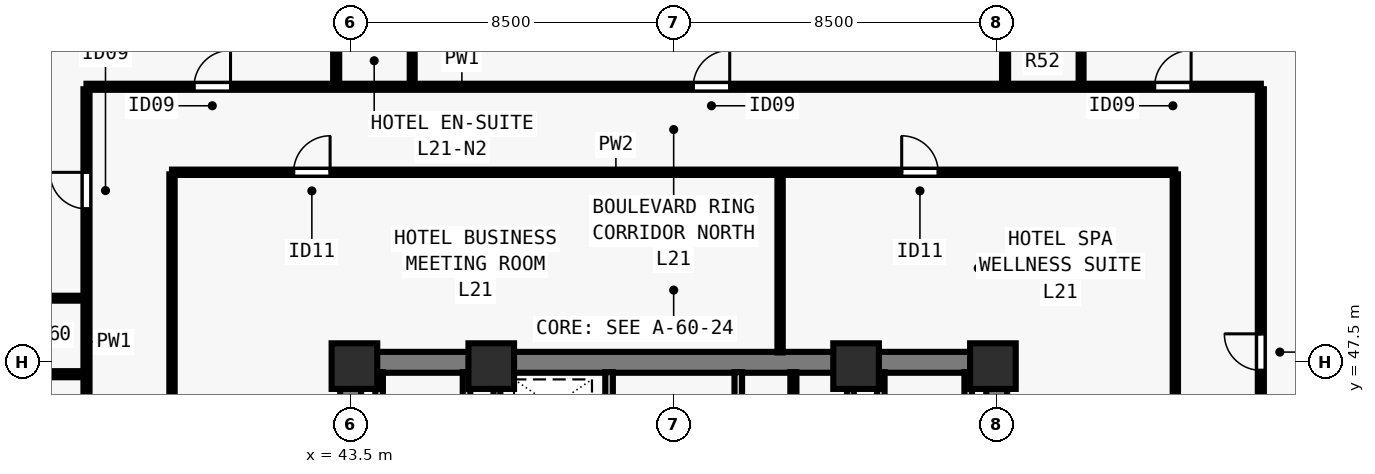
"""IFC4 building model, lengths in metres.
Left out: names, types, materials, properties, quantities, classifications, styles, units other than length and angle.
Written with IfcOpenShell. Run it as: python <this file> out.ifc"""

import sys

from ifc_helpers import new_model, si_unit, direction, frame, frame_2d, origin, origin_2d, place, context, subcontext, project, spatial, rectangle, extrude, element, fill, save


model = new_model("IFC4")
c1 = context("Model", 3, precision=1e-05, world=origin(), true_north=direction((0.0, 1.0)))
c2 = subcontext(c1, "Body", "Model", "MODEL_VIEW")
j1 = project(units=[si_unit("LENGTHUNIT", "METRE"), si_unit("PLANEANGLEUNIT", "RADIAN")], contexts=[c1])
p1 = place(None, origin())
s1 = spatial("IfcSite", under=j1, at=p1, CompositionType="ELEMENT")
p2 = place(p1, origin())
s2 = spatial("IfcBuilding", under=s1, at=p2, CompositionType="ELEMENT")
p3 = place(p2, frame((0.0, 0.0, 79.5)))
s3 = spatial("IfcBuildingStorey", under=s2, at=p3, CompositionType="ELEMENT", Elevation=79.5)
for number, where, z_axis, x_axis in (
    (1, (43.6, 47.4, 0.0), (0.0, 0.0, 1.0), (1.0, 0.0, 0.0)),
    (2, (47.2, 47.4, 0.0), (0.0, 0.0, 1.0), (1.0, 0.0, 0.0)),
    (3, (56.8, 47.4, 0.0), (0.0, 0.0, 1.0), (1.0, 0.0, 0.0)),
    (4, (60.4, 47.4, 0.0), (0.0, 0.0, 1.0), (1.0, 0.0, 0.0)),
):
    element("IfcColumn", number, at=place(p3, frame(where, z_axis=z_axis, x_axis=x_axis)), inside=s3, PredefinedType="COLUMN", context=c2, shape_type="SweptSolid", body=[
        extrude(rectangle(XDim=1.2, YDim=1.2, at=origin_2d()), origin(), (0.0, 0.0, 1.0), 3.5),
    ])
p4 = place(p3, frame((43.225, 47.5, 0.0), z_axis=(0.0, 0.0, 1.0), x_axis=(1.0, 0.0, 0.0)))
e5 = element("IfcWall", 5, at=p4, inside=s3, PredefinedType="SHEAR", context=c2, shape_type="SweptSolid", body=[
    extrude(rectangle(XDim=17.55, YDim=0.55, at=frame_2d((8.775, 0.0))), origin(), (0.0, 0.0, 1.0), 3.28),
])
for number, where, z_axis, x_axis in (
    (6, (43.5, 40.8, 0.0), (0.0, 0.0, 1.0), (0.0, 1.0, 0.0)),
    (7, (60.5, 40.8, 0.0), (0.0, 0.0, 1.0), (0.0, 1.0, 0.0)),
):
    element("IfcWall", number, at=place(p3, frame(where, z_axis=z_axis, x_axis=x_axis)), inside=s3, PredefinedType="SHEAR", context=c2, shape_type="SweptSolid", body=[
        extrude(rectangle(XDim=6.435, YDim=0.55, at=frame_2d((3.218, 0.0))), origin(), (0.0, 0.0, 1.0), 3.28),
    ])
p5 = place(p3, frame((50.3, 40.585, 0.0), z_axis=(0.0, 0.0, 1.0), x_axis=(0.0, 1.0, 0.0)))
e8 = element("IfcWall", 8, at=p5, inside=s3, PredefinedType="SOLIDWALL", context=c2, shape_type="SweptSolid", body=[
    extrude(rectangle(XDim=6.655, YDim=0.2, at=frame_2d((3.328, 0.0))), origin(), (0.0, 0.0, 1.0), 3.28),
])
p6 = place(p5, frame((5.065, 0.0, 0.0)))
e9 = element("IfcOpeningElement", 9, at=p6, cuts=e8, PredefinedType="OPENING", context=c2, shape_type="SweptSolid", body=[
    extrude(rectangle(XDim=0.8, YDim=2.08, at=frame_2d((0.4, 1.04))), frame((0.0, 0.11, 0.0), z_axis=(0.0, -1.0, 0.0), x_axis=(1.0, 0.0, 0.0)), (0.0, 0.0, 1.0), 0.22),
])
p7 = place(p3, frame((53.7, 40.585, 0.0), z_axis=(0.0, 0.0, 1.0), x_axis=(0.0, 1.0, 0.0)))
e10 = element("IfcWall", 10, at=p7, inside=s3, PredefinedType="SOLIDWALL", context=c2, shape_type="SweptSolid", body=[
    extrude(rectangle(XDim=6.655, YDim=0.2, at=frame_2d((3.328, 0.0))), origin(), (0.0, 0.0, 1.0), 3.28),
])
p8 = place(p7, frame((0.195, 0.0, 0.0)))
e11 = element("IfcOpeningElement", 11, at=p8, cuts=e10, PredefinedType="OPENING", context=c2, shape_type="SweptSolid", body=[
    extrude(rectangle(XDim=0.8, YDim=2.08, at=frame_2d((0.4, 1.04))), frame((0.0, 0.11, 0.0), z_axis=(0.0, -1.0, 0.0), x_axis=(1.0, 0.0, 0.0)), (0.0, 0.0, 1.0), 0.22),
])
p9 = place(p7, frame((4.265, 0.0, 0.0)))
e12 = element("IfcOpeningElement", 12, at=p9, cuts=e10, PredefinedType="OPENING", context=c2, shape_type="SweptSolid", body=[
    extrude(rectangle(XDim=0.95, YDim=2.12, at=frame_2d((0.475, 1.06))), frame((0.0, 0.11, 0.0), z_axis=(0.0, -1.0, 0.0), x_axis=(1.0, 0.0, 0.0)), (0.0, 0.0, 1.0), 0.22),
])
for number, where, z_axis, x_axis in (
    (13, (46.55, 43.735, 0.0), (0.0, 0.0, 1.0), (0.0, 1.0, 0.0)),
    (14, (44.25, 43.735, 0.0), (0.0, 0.0, 1.0), (0.0, 1.0, 0.0)),
    (15, (57.45, 43.735, 0.0), (0.0, 0.0, 1.0), (0.0, 1.0, 0.0)),
    (16, (59.75, 43.735, 0.0), (0.0, 0.0, 1.0), (0.0, 1.0, 0.0)),
):
    element("IfcWall", number, at=place(p3, frame(where, z_axis=z_axis, x_axis=x_axis)), inside=s3, PredefinedType="SOLIDWALL", context=c2, shape_type="SweptSolid", body=[
        extrude(rectangle(XDim=3.505, YDim=0.2, at=frame_2d((1.752, 0.0))), origin(), (0.0, 0.0, 1.0), 3.28),
    ])
for number, where, z_axis, x_axis in (
    (17, (47.35, 43.735, 0.0), (0.0, 0.0, 1.0), (0.0, 1.0, 0.0)),
    (18, (56.65, 43.735, 0.0), (0.0, 0.0, 1.0), (0.0, 1.0, 0.0)),
):
    element("IfcWall", number, at=place(p3, frame(where, z_axis=z_axis, x_axis=x_axis)), inside=s3, PredefinedType="SOLIDWALL", context=c2, shape_type="SweptSolid", body=[
        extrude(rectangle(XDim=3.505, YDim=0.18, at=frame_2d((1.752, 0.0))), origin(), (0.0, 0.0, 1.0), 3.28),
    ])
p10 = place(p3, frame((55.15, 44.195, 0.0), z_axis=(0.0, 0.0, 1.0), x_axis=(0.0, 1.0, 0.0)))
e19 = element("IfcWall", 19, at=p10, inside=s3, PredefinedType="PARTITIONING", context=c2, shape_type="SweptSolid", body=[
    extrude(rectangle(XDim=3.045, YDim=0.16, at=frame_2d((1.522, 0.0))), origin(), (0.0, 0.0, 1.0), 3.28),
])
p11 = place(p10, frame((1.025, 0.0, 0.0)))
e20 = element("IfcOpeningElement", 20, at=p11, cuts=e19, PredefinedType="OPENING", context=c2, shape_type="SweptSolid", body=[
    extrude(rectangle(XDim=0.8, YDim=2.1, at=frame_2d((0.4, 1.05))), frame((0.0, 0.09, 0.0), z_axis=(0.0, -1.0, 0.0), x_axis=(1.0, 0.0, 0.0)), (0.0, 0.0, 1.0), 0.18),
])
p12 = place(p3, frame((36.55, 54.75, 0.0), z_axis=(0.0, 0.0, 1.0), x_axis=(1.0, 0.0, 0.0)))
e21 = element("IfcWall", 21, at=p12, inside=s3, PredefinedType="PARTITIONING", context=c2, shape_type="SweptSolid", body=[
    extrude(rectangle(XDim=30.9, YDim=0.16, at=frame_2d((15.45, 0.0))), origin(), (0.0, 0.0, 1.0), 3.28),
])
p13 = place(p12, frame((2.83, 0.0, 0.0)))
e22 = element("IfcOpeningElement", 22, at=p13, cuts=e21, PredefinedType="OPENING", context=c2, shape_type="SweptSolid", body=[
    extrude(rectangle(XDim=0.96, YDim=2.15, at=frame_2d((0.48, 1.075))), frame((0.0, 0.09, 0.0), z_axis=(0.0, -1.0, 0.0), x_axis=(1.0, 0.0, 0.0)), (0.0, 0.0, 1.0), 0.18),
])
p14 = place(p12, frame((15.965, 0.0, 0.0)))
e23 = element("IfcOpeningElement", 23, at=p14, cuts=e21, PredefinedType="OPENING", context=c2, shape_type="SweptSolid", body=[
    extrude(rectangle(XDim=0.96, YDim=2.15, at=frame_2d((0.48, 1.075))), frame((0.0, 0.09, 0.0), z_axis=(0.0, -1.0, 0.0), x_axis=(1.0, 0.0, 0.0)), (0.0, 0.0, 1.0), 0.18),
])
p15 = place(p12, frame((28.105, 0.0, 0.0)))
e24 = element("IfcOpeningElement", 24, at=p15, cuts=e21, PredefinedType="OPENING", context=c2, shape_type="SweptSolid", body=[
    extrude(rectangle(XDim=0.96, YDim=2.15, at=frame_2d((0.48, 1.075))), frame((0.0, 0.09, 0.0), z_axis=(0.0, -1.0, 0.0), x_axis=(1.0, 0.0, 0.0)), (0.0, 0.0, 1.0), 0.18),
])
p16 = place(p3, frame((36.55, 23.315, 0.0), z_axis=(0.0, 0.0, 1.0), x_axis=(0.0, 1.0, 0.0)))
e25 = element("IfcWall", 25, at=p16, inside=s3, PredefinedType="PARTITIONING", context=c2, shape_type="SweptSolid", body=[
    extrude(rectangle(XDim=31.37, YDim=0.16, at=frame_2d((15.685, 0.0))), origin(), (0.0, 0.0, 1.0), 3.28),
])
p17 = place(p16, frame((4.848, 0.0, 0.0)))
e26 = element("IfcOpeningElement", 26, at=p17, cuts=e25, PredefinedType="OPENING", context=c2, shape_type="SweptSolid", body=[
    extrude(rectangle(XDim=0.96, YDim=2.15, at=frame_2d((0.48, 1.075))), frame((0.0, 0.09, 0.0), z_axis=(0.0, -1.0, 0.0), x_axis=(1.0, 0.0, 0.0)), (0.0, 0.0, 1.0), 0.18),
])
p18 = place(p16, frame((12.39, 0.0, 0.0)))
e27 = element("IfcOpeningElement", 27, at=p18, cuts=e25, PredefinedType="OPENING", context=c2, shape_type="SweptSolid", body=[
    extrude(rectangle(XDim=0.96, YDim=2.15, at=frame_2d((0.48, 1.075))), frame((0.0, 0.09, 0.0), z_axis=(0.0, -1.0, 0.0), x_axis=(1.0, 0.0, 0.0)), (0.0, 0.0, 1.0), 0.18),
])
p19 = place(p16, frame((20.265, 0.0, 0.0)))
e28 = element("IfcOpeningElement", 28, at=p19, cuts=e25, PredefinedType="OPENING", context=c2, shape_type="SweptSolid", body=[
    extrude(rectangle(XDim=0.96, YDim=2.15, at=frame_2d((0.48, 1.075))), frame((0.0, 0.09, 0.0), z_axis=(0.0, -1.0, 0.0), x_axis=(1.0, 0.0, 0.0)), (0.0, 0.0, 1.0), 0.18),
])
p20 = place(p16, frame((28.223, 0.0, 0.0)))
e29 = element("IfcOpeningElement", 29, at=p20, cuts=e25, PredefinedType="OPENING", context=c2, shape_type="SweptSolid", body=[
    extrude(rectangle(XDim=0.96, YDim=2.15, at=frame_2d((0.48, 1.075))), frame((0.0, 0.09, 0.0), z_axis=(0.0, -1.0, 0.0), x_axis=(1.0, 0.0, 0.0)), (0.0, 0.0, 1.0), 0.18),
])
p21 = place(p3, frame((67.45, 23.315, 0.0), z_axis=(0.0, 0.0, 1.0), x_axis=(0.0, 1.0, 0.0)))
e30 = element("IfcWall", 30, at=p21, inside=s3, PredefinedType="PARTITIONING", context=c2, shape_type="SweptSolid", body=[
    extrude(rectangle(XDim=31.37, YDim=0.16, at=frame_2d((15.685, 0.0))), origin(), (0.0, 0.0, 1.0), 3.28),
])
p22 = place(p21, frame((8.474, 0.0, 0.0)))
e31 = element("IfcOpeningElement", 31, at=p22, cuts=e30, PredefinedType="OPENING", context=c2, shape_type="SweptSolid", body=[
    extrude(rectangle(XDim=0.96, YDim=2.15, at=frame_2d((0.48, 1.075))), frame((0.0, 0.09, 0.0), z_axis=(0.0, -1.0, 0.0), x_axis=(1.0, 0.0, 0.0)), (0.0, 0.0, 1.0), 0.18),
])
p23 = place(p21, frame((23.974, 0.0, 0.0)))
e32 = element("IfcOpeningElement", 32, at=p23, cuts=e30, PredefinedType="OPENING", context=c2, shape_type="SweptSolid", body=[
    extrude(rectangle(XDim=0.96, YDim=2.15, at=frame_2d((0.48, 1.075))), frame((0.0, 0.09, 0.0), z_axis=(0.0, -1.0, 0.0), x_axis=(1.0, 0.0, 0.0)), (0.0, 0.0, 1.0), 0.18),
])
p24 = place(p3, frame((38.8, 52.5, 0.0), z_axis=(0.0, 0.0, 1.0), x_axis=(1.0, 0.0, 0.0)))
e33 = element("IfcWall", 33, at=p24, inside=s3, PredefinedType="PARTITIONING", context=c2, shape_type="SweptSolid", body=[
    extrude(rectangle(XDim=26.4, YDim=0.14, at=frame_2d((13.2, 0.0))), origin(), (0.0, 0.0, 1.0), 3.28),
])
p25 = place(p24, frame((3.2, 0.0, 0.0)))
e34 = element("IfcOpeningElement", 34, at=p25, cuts=e33, PredefinedType="OPENING", context=c2, shape_type="SweptSolid", body=[
    extrude(rectangle(XDim=0.96, YDim=2.12, at=frame_2d((0.48, 1.06))), frame((0.0, 0.08, 0.0), z_axis=(0.0, -1.0, 0.0), x_axis=(1.0, 0.0, 0.0)), (0.0, 0.0, 1.0), 0.16),
])
p26 = place(p24, frame((19.2, 0.0, 0.0)))
e35 = element("IfcOpeningElement", 35, at=p26, cuts=e33, PredefinedType="OPENING", context=c2, shape_type="SweptSolid", body=[
    extrude(rectangle(XDim=0.96, YDim=2.12, at=frame_2d((0.48, 1.06))), frame((0.0, 0.08, 0.0), z_axis=(0.0, -1.0, 0.0), x_axis=(1.0, 0.0, 0.0)), (0.0, 0.0, 1.0), 0.16),
])
p27 = place(p3, frame((38.8, 40.8, 0.0), z_axis=(0.0, 0.0, 1.0), x_axis=(0.0, 1.0, 0.0)))
e36 = element("IfcWall", 36, at=p27, inside=s3, PredefinedType="PARTITIONING", context=c2, shape_type="SweptSolid", body=[
    extrude(rectangle(XDim=11.645, YDim=0.14, at=frame_2d((5.823, 0.0))), origin(), (0.0, 0.0, 1.0), 3.28),
])
p28 = place(p27, frame((2.5, 0.0, 0.0)))
e37 = element("IfcOpeningElement", 37, at=p28, cuts=e36, PredefinedType="OPENING", context=c2, shape_type="SweptSolid", body=[
    extrude(rectangle(XDim=0.88, YDim=2.1, at=frame_2d((0.44, 1.05))), frame((0.0, 0.08, 0.0), z_axis=(0.0, -1.0, 0.0), x_axis=(1.0, 0.0, 0.0)), (0.0, 0.0, 1.0), 0.16),
])
p29 = place(p3, frame((65.2, 40.8, 0.0), z_axis=(0.0, 0.0, 1.0), x_axis=(0.0, 1.0, 0.0)))
e38 = element("IfcWall", 38, at=p29, inside=s3, PredefinedType="PARTITIONING", context=c2, shape_type="SweptSolid", body=[
    extrude(rectangle(XDim=11.645, YDim=0.14, at=frame_2d((5.823, 0.0))), origin(), (0.0, 0.0, 1.0), 3.28),
])
p30 = place(p29, frame((2.5, 0.0, 0.0)))
e39 = element("IfcOpeningElement", 39, at=p30, cuts=e38, PredefinedType="OPENING", context=c2, shape_type="SweptSolid", body=[
    extrude(rectangle(XDim=0.88, YDim=2.1, at=frame_2d((0.44, 1.05))), frame((0.0, 0.08, 0.0), z_axis=(0.0, -1.0, 0.0), x_axis=(1.0, 0.0, 0.0)), (0.0, 0.0, 1.0), 0.16),
])
p31 = place(p3, frame((54.8, 47.76, 0.0), z_axis=(0.0, 0.0, 1.0), x_axis=(0.0, 1.0, 0.0)))
e40 = element("IfcWall", 40, at=p31, inside=s3, PredefinedType="PARTITIONING", context=c2, shape_type="SweptSolid", body=[
    extrude(rectangle(XDim=4.685, YDim=0.14, at=frame_2d((2.343, 0.0))), origin(), (0.0, 0.0, 1.0), 3.28),
])
p32 = place(p3, frame((43.12, 54.815, 0.0), z_axis=(0.0, 0.0, 1.0), x_axis=(0.0, 1.0, 0.0)))
e41 = element("IfcWall", 41, at=p32, inside=s3, PredefinedType="PARTITIONING", context=c2, shape_type="SweptSolid", body=[
    extrude(rectangle(XDim=9.34, YDim=0.16, at=frame_2d((4.67, 0.0))), origin(), (0.0, 0.0, 1.0), 3.28),
])
p33 = place(p3, frame((45.12, 54.815, 0.0), z_axis=(0.0, 0.0, 1.0), x_axis=(0.0, 1.0, 0.0)))
e42 = element("IfcWall", 42, at=p33, inside=s3, PredefinedType="PLUMBINGWALL", context=c2, shape_type="SweptSolid", body=[
    extrude(rectangle(XDim=2.235, YDim=0.13, at=frame_2d((1.118, 0.0))), origin(), (0.0, 0.0, 1.0), 3.28),
])
p34 = place(p3, frame((60.72, 54.815, 0.0), z_axis=(0.0, 0.0, 1.0), x_axis=(0.0, 1.0, 0.0)))
e43 = element("IfcWall", 43, at=p34, inside=s3, PredefinedType="PARTITIONING", context=c2, shape_type="SweptSolid", body=[
    extrude(rectangle(XDim=9.34, YDim=0.16, at=frame_2d((4.67, 0.0))), origin(), (0.0, 0.0, 1.0), 3.28),
])
p35 = place(p3, frame((62.72, 54.815, 0.0), z_axis=(0.0, 0.0, 1.0), x_axis=(0.0, 1.0, 0.0)))
e44 = element("IfcWall", 44, at=p35, inside=s3, PredefinedType="PLUMBINGWALL", context=c2, shape_type="SweptSolid", body=[
    extrude(rectangle(XDim=2.235, YDim=0.13, at=frame_2d((1.118, 0.0))), origin(), (0.0, 0.0, 1.0), 3.28),
])
p36 = place(p3, frame((26.845, 47.187, 0.0), z_axis=(0.0, 0.0, 1.0), x_axis=(1.0, 0.0, 0.0)))
e45 = element("IfcWall", 45, at=p36, inside=s3, PredefinedType="PARTITIONING", context=c2, shape_type="SweptSolid", body=[
    extrude(rectangle(XDim=9.64, YDim=0.16, at=frame_2d((4.82, 0.0))), origin(), (0.0, 0.0, 1.0), 3.28),
])
p37 = place(p3, frame((34.25, 49.187, 0.0), z_axis=(0.0, 0.0, 1.0), x_axis=(1.0, 0.0, 0.0)))
e46 = element("IfcWall", 46, at=p37, inside=s3, PredefinedType="PLUMBINGWALL", context=c2, shape_type="SweptSolid", body=[
    extrude(rectangle(XDim=2.235, YDim=0.13, at=frame_2d((1.118, 0.0))), origin(), (0.0, 0.0, 1.0), 3.28),
])
p38 = place(p25, origin())
e47 = element("IfcDoor", 47, at=p38, inside=s3, OperationType="SINGLE_SWING_RIGHT", PredefinedType="DOOR", context=c2, shape_type="SweptSolid", body=[
    extrude(rectangle(XDim=0.96, YDim=2.12, at=frame_2d((0.48, 1.06))), frame((0.0, 0.025, 0.0), z_axis=(0.0, -1.0, 0.0), x_axis=(1.0, 0.0, 0.0)), (0.0, 0.0, 1.0), 0.05),
])
fill(e34, e47)
p39 = place(p26, origin())
e48 = element("IfcDoor", 48, at=p39, inside=s3, OperationType="SINGLE_SWING_LEFT", PredefinedType="DOOR", context=c2, shape_type="SweptSolid", body=[
    extrude(rectangle(XDim=0.96, YDim=2.12, at=frame_2d((0.48, 1.06))), frame((0.0, 0.025, 0.0), z_axis=(0.0, -1.0, 0.0), x_axis=(1.0, 0.0, 0.0)), (0.0, 0.0, 1.0), 0.05),
])
fill(e35, e48)
p40 = place(p13, origin())
e49 = element("IfcDoor", 49, at=p40, inside=s3, OperationType="SINGLE_SWING_RIGHT", PredefinedType="DOOR", context=c2, shape_type="SweptSolid", body=[
    extrude(rectangle(XDim=0.96, YDim=2.15, at=frame_2d((0.48, 1.075))), frame((0.0, 0.025, 0.0), z_axis=(0.0, -1.0, 0.0), x_axis=(1.0, 0.0, 0.0)), (0.0, 0.0, 1.0), 0.05),
])
fill(e22, e49)
p41 = place(p14, origin())
e50 = element("IfcDoor", 50, at=p41, inside=s3, OperationType="SINGLE_SWING_RIGHT", PredefinedType="DOOR", context=c2, shape_type="SweptSolid", body=[
    extrude(rectangle(XDim=0.96, YDim=2.15, at=frame_2d((0.48, 1.075))), frame((0.0, 0.025, 0.0), z_axis=(0.0, -1.0, 0.0), x_axis=(1.0, 0.0, 0.0)), (0.0, 0.0, 1.0), 0.05),
])
fill(e23, e50)
p42 = place(p15, origin())
e51 = element("IfcDoor", 51, at=p42, inside=s3, OperationType="SINGLE_SWING_RIGHT", PredefinedType="DOOR", context=c2, shape_type="SweptSolid", body=[
    extrude(rectangle(XDim=0.96, YDim=2.15, at=frame_2d((0.48, 1.075))), frame((0.0, 0.025, 0.0), z_axis=(0.0, -1.0, 0.0), x_axis=(1.0, 0.0, 0.0)), (0.0, 0.0, 1.0), 0.05),
])
fill(e24, e51)
p43 = place(p20, origin())
e52 = element("IfcDoor", 52, at=p43, inside=s3, OperationType="SINGLE_SWING_RIGHT", PredefinedType="DOOR", context=c2, shape_type="SweptSolid", body=[
    extrude(rectangle(XDim=0.96, YDim=2.15, at=frame_2d((0.48, 1.075))), frame((0.0, 0.025, 0.0), z_axis=(0.0, -1.0, 0.0), x_axis=(1.0, 0.0, 0.0)), (0.0, 0.0, 1.0), 0.05),
])
fill(e29, e52)
p44 = place(p23, origin())
e53 = element("IfcDoor", 53, at=p44, inside=s3, OperationType="SINGLE_SWING_RIGHT", PredefinedType="DOOR", context=c2, shape_type="SweptSolid", body=[
    extrude(rectangle(XDim=0.96, YDim=2.15, at=frame_2d((0.48, 1.075))), frame((0.0, 0.025, 0.0), z_axis=(0.0, -1.0, 0.0), x_axis=(1.0, 0.0, 0.0)), (0.0, 0.0, 1.0), 0.05),
])
fill(e32, e53)
save(model, sys.argv[1])
